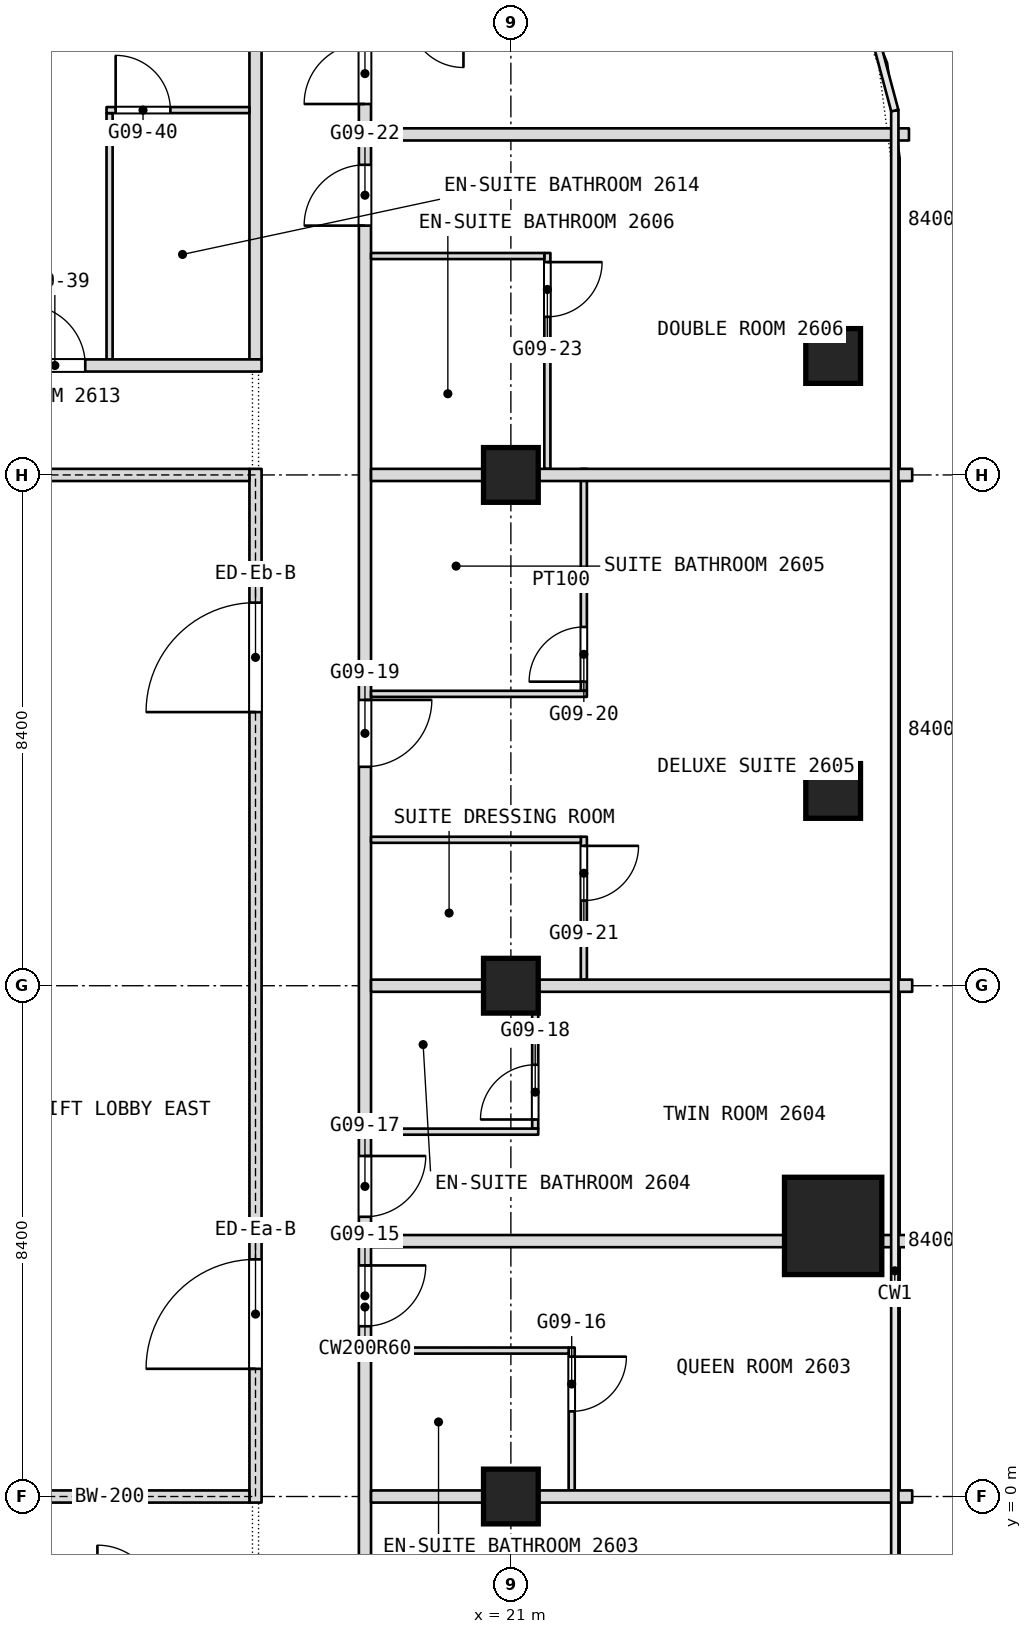
"""IFC4 building model, lengths in metres.
Left out: names, types, materials, properties, quantities, classifications, styles, units other than length and angle.
Written with IfcOpenShell. Run it as: python <this file> out.ifc"""

import sys

from ifc_helpers import new_model, si_unit, direction, frame, frame_2d, origin, origin_2d, place, context, subcontext, project, spatial, rectangle, extrude, element, fill, save


model = new_model("IFC4")
c1 = context("Model", 3, precision=1e-05, world=origin(), true_north=direction((0.0, 1.0)))
c2 = subcontext(c1, "Body", "Model", "MODEL_VIEW")
j1 = project(units=[si_unit("LENGTHUNIT", "METRE"), si_unit("PLANEANGLEUNIT", "RADIAN")], contexts=[c1])
p1 = place(None, origin())
s1 = spatial("IfcSite", under=j1, at=p1, CompositionType="ELEMENT")
p2 = place(p1, origin())
s2 = spatial("IfcBuilding", under=s1, at=p2, CompositionType="ELEMENT")
p3 = place(p2, frame((0.0, 0.0, 119.3)))
s3 = spatial("IfcBuildingStorey", under=s2, at=p3, CompositionType="ELEMENT", Elevation=119.3)
p4 = place(p3, frame((26.3, 4.45, 0.0), z_axis=(0.0, 0.0, 1.0), x_axis=(1.0, 0.0, 0.0)))
e1 = element("IfcColumn", 1, at=p4, inside=s3, PredefinedType="COLUMN", context=c2, shape_type="SweptSolid", body=[
    extrude(rectangle(XDim=1.6, YDim=1.6, at=origin_2d()), origin(), (0.0, 0.0, 1.0), 3.6),
])
for number, where, z_axis, x_axis in (
    (2, (21.0, 0.0, 0.0), (0.0, 0.0, 1.0), (1.0, 0.0, 0.0)),
    (3, (21.0, 8.4, 0.0), (0.0, 0.0, 1.0), (1.0, 0.0, 0.0)),
    (4, (21.0, 16.8, 0.0), (0.0, 0.0, 1.0), (1.0, 0.0, 0.0)),
    (5, (26.3, 18.756, 0.0), (0.0, 0.0, 1.0), (1.0, 0.0, 0.0)),
    (6, (26.3, 11.603, 0.0), (0.0, 0.0, 1.0), (1.0, 0.0, 0.0)),
):
    element("IfcColumn", number, at=place(p3, frame(where, z_axis=z_axis, x_axis=x_axis)), inside=s3, PredefinedType="COLUMN", context=c2, shape_type="SweptSolid", body=[
        extrude(rectangle(XDim=0.9, YDim=0.9, at=origin_2d()), origin(), (0.0, 0.0, 1.0), 3.6),
    ])
p5 = place(p3, frame((22.2, 8.5, 0.0), z_axis=(0.0, 0.0, 1.0), x_axis=(0.0, 1.0, 0.0)))
e7 = element("IfcWall", 7, at=p5, inside=s3, PredefinedType="PARTITIONING", context=c2, shape_type="SweptSolid", body=[
    extrude(rectangle(XDim=2.35, YDim=0.1, at=frame_2d((1.175, 0.0))), origin(), (0.0, 0.0, 1.0), 3.34),
])
p6 = place(p5, frame((1.3, 0.0, 0.0)))
e8 = element("IfcOpeningElement", 8, at=p6, cuts=e7, PredefinedType="OPENING", context=c2, shape_type="SweptSolid", body=[
    extrude(rectangle(XDim=0.9, YDim=2.1, at=frame_2d((0.45, 1.05))), frame((0.0, 0.05, 0.0), z_axis=(0.0, -1.0, 0.0), x_axis=(1.0, 0.0, 0.0)), (0.0, 0.0, 1.0), 0.1),
])
p7 = place(p3, frame((22.2, 13.25, 0.0), z_axis=(0.0, 0.0, 1.0), x_axis=(0.0, 1.0, 0.0)))
e9 = element("IfcWall", 9, at=p7, inside=s3, PredefinedType="PARTITIONING", context=c2, shape_type="SweptSolid", body=[
    extrude(rectangle(XDim=3.65, YDim=0.1, at=frame_2d((1.825, 0.0))), origin(), (0.0, 0.0, 1.0), 3.34),
])
p8 = place(p7, frame((0.15, 0.0, 0.0)))
e10 = element("IfcOpeningElement", 10, at=p8, cuts=e9, PredefinedType="OPENING", context=c2, shape_type="SweptSolid", body=[
    extrude(rectangle(XDim=0.9, YDim=2.1, at=frame_2d((0.45, 1.05))), frame((0.0, 0.05, 0.0), z_axis=(0.0, -1.0, 0.0), x_axis=(1.0, 0.0, 0.0)), (0.0, 0.0, 1.0), 0.1),
])
p9 = place(p3, frame((22.0, 0.1, 0.0), z_axis=(0.0, 0.0, 1.0), x_axis=(0.0, 1.0, 0.0)))
e11 = element("IfcWall", 11, at=p9, inside=s3, PredefinedType="PARTITIONING", context=c2, shape_type="SweptSolid", body=[
    extrude(rectangle(XDim=2.35, YDim=0.1, at=frame_2d((1.175, 0.0))), origin(), (0.0, 0.0, 1.0), 3.34),
])
p10 = place(p9, frame((1.3, 0.0, 0.0)))
e12 = element("IfcOpeningElement", 12, at=p10, cuts=e11, PredefinedType="OPENING", context=c2, shape_type="SweptSolid", body=[
    extrude(rectangle(XDim=0.9, YDim=2.1, at=frame_2d((0.45, 1.05))), frame((0.0, 0.05, 0.0), z_axis=(0.0, -1.0, 0.0), x_axis=(1.0, 0.0, 0.0)), (0.0, 0.0, 1.0), 0.1),
])
p11 = place(p3, frame((21.6, 16.9, 0.0), z_axis=(0.0, 0.0, 1.0), x_axis=(0.0, 1.0, 0.0)))
e13 = element("IfcWall", 13, at=p11, inside=s3, PredefinedType="PARTITIONING", context=c2, shape_type="SweptSolid", body=[
    extrude(rectangle(XDim=3.55, YDim=0.1, at=frame_2d((1.775, 0.0))), origin(), (0.0, 0.0, 1.0), 3.34),
])
p12 = place(p11, frame((2.5, 0.0, 0.0)))
e14 = element("IfcOpeningElement", 14, at=p12, cuts=e13, PredefinedType="OPENING", context=c2, shape_type="SweptSolid", body=[
    extrude(rectangle(XDim=0.9, YDim=2.1, at=frame_2d((0.45, 1.05))), frame((0.0, 0.05, 0.0), z_axis=(0.0, -1.0, 0.0), x_axis=(1.0, 0.0, 0.0)), (0.0, 0.0, 1.0), 0.1),
])
p13 = place(p3, frame((21.4, 6.05, 0.0), z_axis=(0.0, 0.0, 1.0), x_axis=(0.0, 1.0, 0.0)))
e15 = element("IfcWall", 15, at=p13, inside=s3, PredefinedType="PARTITIONING", context=c2, shape_type="SweptSolid", body=[
    extrude(rectangle(XDim=2.45, YDim=0.1, at=frame_2d((1.225, 0.0))), origin(), (0.0, 0.0, 1.0), 3.34),
])
p14 = place(p13, frame((0.15, 0.0, 0.0)))
e16 = element("IfcOpeningElement", 16, at=p14, cuts=e15, PredefinedType="OPENING", context=c2, shape_type="SweptSolid", body=[
    extrude(rectangle(XDim=0.9, YDim=2.1, at=frame_2d((0.45, 1.05))), frame((0.0, 0.05, 0.0), z_axis=(0.0, -1.0, 0.0), x_axis=(1.0, 0.0, 0.0)), (0.0, 0.0, 1.0), 0.1),
])
p15 = place(p3, frame((18.6, -21.708, 0.0), z_axis=(0.0, 0.0, 1.0), x_axis=(0.0, 1.0, 0.0)))
e17 = element("IfcWall", 17, at=p15, inside=s3, PredefinedType="PARTITIONING", context=c2, shape_type="SweptSolid", body=[
    extrude(rectangle(XDim=49.648, YDim=0.2, at=frame_2d((24.824, 0.0))), origin(), (0.0, 0.0, 1.0), 3.34),
])
p16 = place(p15, frame((2.8, 0.0, 0.0)))
e18 = element("IfcOpeningElement", 18, at=p16, cuts=e17, PredefinedType="OPENING", context=c2, shape_type="SweptSolid", body=[
    extrude(rectangle(XDim=1.0, YDim=2.1, at=frame_2d((0.5, 1.05))), frame((0.0, 0.1, 0.0), z_axis=(0.0, -1.0, 0.0), x_axis=(1.0, 0.0, 0.0)), (0.0, 0.0, 1.0), 0.2),
])
p17 = place(p15, frame((10.658, 0.0, 0.0)))
e19 = element("IfcOpeningElement", 19, at=p17, cuts=e17, PredefinedType="OPENING", context=c2, shape_type="SweptSolid", body=[
    extrude(rectangle(XDim=1.1, YDim=2.1, at=frame_2d((0.55, 1.05))), frame((0.0, 0.1, 0.0), z_axis=(0.0, -1.0, 0.0), x_axis=(1.0, 0.0, 0.0)), (0.0, 0.0, 1.0), 0.2),
])
p18 = place(p15, frame((16.608, 0.0, 0.0)))
e20 = element("IfcOpeningElement", 20, at=p18, cuts=e17, PredefinedType="OPENING", context=c2, shape_type="SweptSolid", body=[
    extrude(rectangle(XDim=1.8, YDim=2.1, at=frame_2d((0.9, 1.05))), frame((0.0, 0.1, 0.0), z_axis=(0.0, -1.0, 0.0), x_axis=(1.0, 0.0, 0.0)), (0.0, 0.0, 1.0), 0.2),
])
p19 = place(p15, frame((24.508, 0.0, 0.0)))
e21 = element("IfcOpeningElement", 21, at=p19, cuts=e17, PredefinedType="OPENING", context=c2, shape_type="SweptSolid", body=[
    extrude(rectangle(XDim=1.0, YDim=2.1, at=frame_2d((0.5, 1.05))), frame((0.0, 0.1, 0.0), z_axis=(0.0, -1.0, 0.0), x_axis=(1.0, 0.0, 0.0)), (0.0, 0.0, 1.0), 0.2),
])
p20 = place(p15, frame((26.308, 0.0, 0.0)))
e22 = element("IfcOpeningElement", 22, at=p20, cuts=e17, PredefinedType="OPENING", context=c2, shape_type="SweptSolid", body=[
    extrude(rectangle(XDim=1.0, YDim=2.1, at=frame_2d((0.5, 1.05))), frame((0.0, 0.1, 0.0), z_axis=(0.0, -1.0, 0.0), x_axis=(1.0, 0.0, 0.0)), (0.0, 0.0, 1.0), 0.2),
])
p21 = place(p15, frame((33.708, 0.0, 0.0)))
e23 = element("IfcOpeningElement", 23, at=p21, cuts=e17, PredefinedType="OPENING", context=c2, shape_type="SweptSolid", body=[
    extrude(rectangle(XDim=1.1, YDim=2.1, at=frame_2d((0.55, 1.05))), frame((0.0, 0.1, 0.0), z_axis=(0.0, -1.0, 0.0), x_axis=(1.0, 0.0, 0.0)), (0.0, 0.0, 1.0), 0.2),
])
p22 = place(p15, frame((42.608, 0.0, 0.0)))
e24 = element("IfcOpeningElement", 24, at=p22, cuts=e17, PredefinedType="OPENING", context=c2, shape_type="SweptSolid", body=[
    extrude(rectangle(XDim=1.0, YDim=2.1, at=frame_2d((0.5, 1.05))), frame((0.0, 0.1, 0.0), z_axis=(0.0, -1.0, 0.0), x_axis=(1.0, 0.0, 0.0)), (0.0, 0.0, 1.0), 0.2),
])
p23 = place(p15, frame((44.608, 0.0, 0.0)))
e25 = element("IfcOpeningElement", 25, at=p23, cuts=e17, PredefinedType="OPENING", context=c2, shape_type="SweptSolid", body=[
    extrude(rectangle(XDim=1.0, YDim=2.1, at=frame_2d((0.5, 1.05))), frame((0.0, 0.1, 0.0), z_axis=(0.0, -1.0, 0.0), x_axis=(1.0, 0.0, 0.0)), (0.0, 0.0, 1.0), 0.2),
])
p24 = place(p3, frame((16.8, 18.7, 0.0), z_axis=(0.0, 0.0, 1.0), x_axis=(0.0, 1.0, 0.0)))
e26 = element("IfcWall", 26, at=p24, inside=s3, PredefinedType="PARTITIONING", context=c2, shape_type="SweptSolid", body=[
    extrude(rectangle(XDim=9.24, YDim=0.2, at=frame_2d((4.62, 0.0))), origin(), (0.0, 0.0, 1.0), 3.34),
])
p25 = place(p3, frame((14.4, 18.7, 0.0), z_axis=(0.0, 0.0, 1.0), x_axis=(0.0, 1.0, 0.0)))
e27 = element("IfcWall", 27, at=p25, inside=s3, PredefinedType="PARTITIONING", context=c2, shape_type="SweptSolid", body=[
    extrude(rectangle(XDim=4.05, YDim=0.1, at=frame_2d((2.025, 0.0))), origin(), (0.0, 0.0, 1.0), 3.34),
])
p26 = place(p3, frame((18.7, 0.0, 0.0), z_axis=(0.0, 0.0, 1.0), x_axis=(1.0, 0.0, 0.0)))
e28 = element("IfcWall", 28, at=p26, inside=s3, PredefinedType="PARTITIONING", context=c2, shape_type="SweptSolid", body=[
    extrude(rectangle(XDim=8.9, YDim=0.2, at=frame_2d((4.45, 0.0))), origin(), (0.0, 0.0, 1.0), 2.89),
])
p27 = place(p3, frame((18.7, 2.4, 0.0), z_axis=(0.0, 0.0, 1.0), x_axis=(1.0, 0.0, 0.0)))
e29 = element("IfcWall", 29, at=p27, inside=s3, PredefinedType="PARTITIONING", context=c2, shape_type="SweptSolid", body=[
    extrude(rectangle(XDim=3.25, YDim=0.1, at=frame_2d((1.625, 0.0))), origin(), (0.0, 0.0, 1.0), 3.34),
])
p28 = place(p3, frame((18.7, 4.2, 0.0), z_axis=(0.0, 0.0, 1.0), x_axis=(1.0, 0.0, 0.0)))
e30 = element("IfcWall", 30, at=p28, inside=s3, PredefinedType="PARTITIONING", context=c2, shape_type="SweptSolid", body=[
    extrude(rectangle(XDim=6.8, YDim=0.2, at=frame_2d((3.4, 0.0))), origin(), (0.0, 0.0, 1.0), 3.34),
])
p29 = place(p3, frame((27.1, 4.2, 0.0), z_axis=(0.0, 0.0, 1.0), x_axis=(1.0, 0.0, 0.0)))
e31 = element("IfcWall", 31, at=p29, inside=s3, PredefinedType="PARTITIONING", context=c2, shape_type="SweptSolid", body=[
    extrude(rectangle(XDim=0.5, YDim=0.2, at=frame_2d((0.25, 0.0))), origin(), (0.0, 0.0, 1.0), 3.34),
])
p30 = place(p3, frame((18.7, 6.0, 0.0), z_axis=(0.0, 0.0, 1.0), x_axis=(1.0, 0.0, 0.0)))
e32 = element("IfcWall", 32, at=p30, inside=s3, PredefinedType="PARTITIONING", context=c2, shape_type="SweptSolid", body=[
    extrude(rectangle(XDim=2.75, YDim=0.1, at=frame_2d((1.375, 0.0))), origin(), (0.0, 0.0, 1.0), 3.34),
])
p31 = place(p3, frame((18.7, 8.4, 0.0), z_axis=(0.0, 0.0, 1.0), x_axis=(1.0, 0.0, 0.0)))
e33 = element("IfcWall", 33, at=p31, inside=s3, PredefinedType="PARTITIONING", context=c2, shape_type="SweptSolid", body=[
    extrude(rectangle(XDim=8.9, YDim=0.2, at=frame_2d((4.45, 0.0))), origin(), (0.0, 0.0, 1.0), 2.89),
])
p32 = place(p3, frame((18.7, 10.8, 0.0), z_axis=(0.0, 0.0, 1.0), x_axis=(1.0, 0.0, 0.0)))
e34 = element("IfcWall", 34, at=p32, inside=s3, PredefinedType="PARTITIONING", context=c2, shape_type="SweptSolid", body=[
    extrude(rectangle(XDim=3.45, YDim=0.1, at=frame_2d((1.725, 0.0))), origin(), (0.0, 0.0, 1.0), 3.34),
])
p33 = place(p3, frame((18.7, 13.2, 0.0), z_axis=(0.0, 0.0, 1.0), x_axis=(1.0, 0.0, 0.0)))
e35 = element("IfcWall", 35, at=p33, inside=s3, PredefinedType="PARTITIONING", context=c2, shape_type="SweptSolid", body=[
    extrude(rectangle(XDim=3.55, YDim=0.1, at=frame_2d((1.775, 0.0))), origin(), (0.0, 0.0, 1.0), 3.34),
])
p34 = place(p3, frame((18.7, 16.8, 0.0), z_axis=(0.0, 0.0, 1.0), x_axis=(1.0, 0.0, 0.0)))
e36 = element("IfcWall", 36, at=p34, inside=s3, PredefinedType="PARTITIONING", context=c2, shape_type="SweptSolid", body=[
    extrude(rectangle(XDim=8.9, YDim=0.2, at=frame_2d((4.45, 0.0))), origin(), (0.0, 0.0, 1.0), 2.89),
])
p35 = place(p3, frame((10.7, 18.6, 0.0), z_axis=(0.0, 0.0, 1.0), x_axis=(1.0, 0.0, 0.0)))
e37 = element("IfcWall", 37, at=p35, inside=s3, PredefinedType="PARTITIONING", context=c2, shape_type="SweptSolid", body=[
    extrude(rectangle(XDim=6.2, YDim=0.2, at=frame_2d((3.1, 0.0))), origin(), (0.0, 0.0, 1.0), 3.34),
])
p36 = place(p35, frame((2.3, 0.0, 0.0)))
e38 = element("IfcOpeningElement", 38, at=p36, cuts=e37, PredefinedType="OPENING", context=c2, shape_type="SweptSolid", body=[
    extrude(rectangle(XDim=1.0, YDim=2.1, at=frame_2d((0.5, 1.05))), frame((0.0, 0.1, 0.0), z_axis=(0.0, -1.0, 0.0), x_axis=(1.0, 0.0, 0.0)), (0.0, 0.0, 1.0), 0.2),
])
p37 = place(p3, frame((18.7, 20.4, 0.0), z_axis=(0.0, 0.0, 1.0), x_axis=(1.0, 0.0, 0.0)))
e39 = element("IfcWall", 39, at=p37, inside=s3, PredefinedType="PARTITIONING", context=c2, shape_type="SweptSolid", body=[
    extrude(rectangle(XDim=2.85, YDim=0.1, at=frame_2d((1.425, 0.0))), origin(), (0.0, 0.0, 1.0), 3.34),
])
p38 = place(p3, frame((18.7, 22.4, 0.0), z_axis=(0.0, 0.0, 1.0), x_axis=(1.0, 0.0, 0.0)))
e40 = element("IfcWall", 40, at=p38, inside=s3, PredefinedType="PARTITIONING", context=c2, shape_type="SweptSolid", body=[
    extrude(rectangle(XDim=8.847, YDim=0.2, at=frame_2d((4.424, 0.0))), origin(), (0.0, 0.0, 1.0), 3.34),
])
p39 = place(p3, frame((14.35, 22.8, 0.0), z_axis=(0.0, 0.0, 1.0), x_axis=(1.0, 0.0, 0.0)))
e41 = element("IfcWall", 41, at=p39, inside=s3, PredefinedType="PARTITIONING", context=c2, shape_type="SweptSolid", body=[
    extrude(rectangle(XDim=2.35, YDim=0.1, at=frame_2d((1.175, 0.0))), origin(), (0.0, 0.0, 1.0), 3.34),
])
p40 = place(p39, frame((0.15, 0.0, 0.0)))
e42 = element("IfcOpeningElement", 42, at=p40, cuts=e41, PredefinedType="OPENING", context=c2, shape_type="SweptSolid", body=[
    extrude(rectangle(XDim=0.9, YDim=2.1, at=frame_2d((0.45, 1.05))), frame((0.0, 0.05, 0.0), z_axis=(0.0, -1.0, 0.0), x_axis=(1.0, 0.0, 0.0)), (0.0, 0.0, 1.0), 0.1),
])
p41 = place(p3, frame((16.8, -0.1, 0.0), z_axis=(0.0, 0.0, 1.0), x_axis=(0.0, 1.0, 0.0)))
e43 = element("IfcWall", 43, at=p41, inside=s3, PredefinedType="PARTITIONING", context=c2, shape_type="SweptSolid", body=[
    extrude(rectangle(XDim=17.0, YDim=0.2, at=frame_2d((8.5, 0.0))), origin(), (0.0, 0.0, 1.0), 3.34),
])
p42 = place(p41, frame((2.2, 0.0, 0.0)))
e44 = element("IfcOpeningElement", 44, at=p42, cuts=e43, PredefinedType="OPENING", context=c2, shape_type="SweptSolid", body=[
    extrude(rectangle(XDim=1.8, YDim=2.1, at=frame_2d((0.9, 1.05))), frame((0.0, 0.1, 0.0), z_axis=(0.0, -1.0, 0.0), x_axis=(1.0, 0.0, 0.0)), (0.0, 0.0, 1.0), 0.2),
])
p43 = place(p41, frame((13.0, 0.0, 0.0)))
e45 = element("IfcOpeningElement", 45, at=p43, cuts=e43, PredefinedType="OPENING", context=c2, shape_type="SweptSolid", body=[
    extrude(rectangle(XDim=1.8, YDim=2.1, at=frame_2d((0.9, 1.05))), frame((0.0, 0.1, 0.0), z_axis=(0.0, -1.0, 0.0), x_axis=(1.0, 0.0, 0.0)), (0.0, 0.0, 1.0), 0.2),
])
for number, where, z_axis, x_axis in (
    (46, (12.1, 0.0, 0.0), (0.0, 0.0, 1.0), (1.0, 0.0, 0.0)),
    (47, (12.1, 16.8, 0.0), (0.0, 0.0, 1.0), (1.0, 0.0, 0.0)),
):
    element("IfcWall", number, at=place(p3, frame(where, z_axis=z_axis, x_axis=x_axis)), inside=s3, PredefinedType="PARTITIONING", context=c2, shape_type="SweptSolid", body=[
        extrude(rectangle(XDim=4.6, YDim=0.2, at=frame_2d((2.3, 0.0))), origin(), (0.0, 0.0, 1.0), 2.89),
    ])
p44 = place(p6, origin())
e48 = element("IfcDoor", 48, at=p44, inside=s3, OperationType="SINGLE_SWING_RIGHT", PredefinedType="DOOR", context=c2, shape_type="SweptSolid", body=[
    extrude(rectangle(XDim=0.9, YDim=2.1, at=frame_2d((0.45, 1.05))), frame((0.0, 0.025, 0.0), z_axis=(0.0, -1.0, 0.0), x_axis=(1.0, 0.0, 0.0)), (0.0, 0.0, 1.0), 0.05),
])
fill(e8, e48)
p45 = place(p8, origin())
e49 = element("IfcDoor", 49, at=p45, inside=s3, OperationType="SINGLE_SWING_LEFT", PredefinedType="DOOR", context=c2, shape_type="SweptSolid", body=[
    extrude(rectangle(XDim=0.9, YDim=2.1, at=frame_2d((0.45, 1.05))), frame((0.0, 0.025, 0.0), z_axis=(0.0, -1.0, 0.0), x_axis=(1.0, 0.0, 0.0)), (0.0, 0.0, 1.0), 0.05),
])
fill(e10, e49)
p46 = place(p10, origin())
e50 = element("IfcDoor", 50, at=p46, inside=s3, OperationType="SINGLE_SWING_RIGHT", PredefinedType="DOOR", context=c2, shape_type="SweptSolid", body=[
    extrude(rectangle(XDim=0.9, YDim=2.1, at=frame_2d((0.45, 1.05))), frame((0.0, 0.025, 0.0), z_axis=(0.0, -1.0, 0.0), x_axis=(1.0, 0.0, 0.0)), (0.0, 0.0, 1.0), 0.05),
])
fill(e12, e50)
p47 = place(p12, origin())
e51 = element("IfcDoor", 51, at=p47, inside=s3, OperationType="SINGLE_SWING_RIGHT", PredefinedType="DOOR", context=c2, shape_type="SweptSolid", body=[
    extrude(rectangle(XDim=0.9, YDim=2.1, at=frame_2d((0.45, 1.05))), frame((0.0, 0.025, 0.0), z_axis=(0.0, -1.0, 0.0), x_axis=(1.0, 0.0, 0.0)), (0.0, 0.0, 1.0), 0.05),
])
fill(e14, e51)
p48 = place(p14, origin())
e52 = element("IfcDoor", 52, at=p48, inside=s3, OperationType="SINGLE_SWING_LEFT", PredefinedType="DOOR", context=c2, shape_type="SweptSolid", body=[
    extrude(rectangle(XDim=0.9, YDim=2.1, at=frame_2d((0.45, 1.05))), frame((0.0, 0.025, 0.0), z_axis=(0.0, -1.0, 0.0), x_axis=(1.0, 0.0, 0.0)), (0.0, 0.0, 1.0), 0.05),
])
fill(e16, e52)
p49 = place(p19, origin())
e53 = element("IfcDoor", 53, at=p49, inside=s3, OperationType="SINGLE_SWING_LEFT", PredefinedType="DOOR", context=c2, shape_type="SweptSolid", body=[
    extrude(rectangle(XDim=1.0, YDim=2.1, at=frame_2d((0.5, 1.05))), frame((0.0, 0.025, 0.0), z_axis=(0.0, -1.0, 0.0), x_axis=(1.0, 0.0, 0.0)), (0.0, 0.0, 1.0), 0.05),
])
fill(e21, e53)
p50 = place(p20, origin())
e54 = element("IfcDoor", 54, at=p50, inside=s3, OperationType="SINGLE_SWING_LEFT", PredefinedType="DOOR", context=c2, shape_type="SweptSolid", body=[
    extrude(rectangle(XDim=1.0, YDim=2.1, at=frame_2d((0.5, 1.05))), frame((0.0, 0.025, 0.0), z_axis=(0.0, -1.0, 0.0), x_axis=(1.0, 0.0, 0.0)), (0.0, 0.0, 1.0), 0.05),
])
fill(e22, e54)
p51 = place(p21, origin())
e55 = element("IfcDoor", 55, at=p51, inside=s3, OperationType="SINGLE_SWING_LEFT", PredefinedType="DOOR", context=c2, shape_type="SweptSolid", body=[
    extrude(rectangle(XDim=1.1, YDim=2.1, at=frame_2d((0.55, 1.05))), frame((0.0, 0.025, 0.0), z_axis=(0.0, -1.0, 0.0), x_axis=(1.0, 0.0, 0.0)), (0.0, 0.0, 1.0), 0.05),
])
fill(e23, e55)
p52 = place(p22, origin())
e56 = element("IfcDoor", 56, at=p52, inside=s3, OperationType="SINGLE_SWING_RIGHT", PredefinedType="DOOR", context=c2, shape_type="SweptSolid", body=[
    extrude(rectangle(XDim=1.0, YDim=2.1, at=frame_2d((0.5, 1.05))), frame((0.0, 0.025, 0.0), z_axis=(0.0, -1.0, 0.0), x_axis=(1.0, 0.0, 0.0)), (0.0, 0.0, 1.0), 0.05),
])
fill(e24, e56)
p53 = place(p23, origin())
e57 = element("IfcDoor", 57, at=p53, inside=s3, OperationType="SINGLE_SWING_RIGHT", PredefinedType="DOOR", context=c2, shape_type="SweptSolid", body=[
    extrude(rectangle(XDim=1.0, YDim=2.1, at=frame_2d((0.5, 1.05))), frame((0.0, 0.025, 0.0), z_axis=(0.0, -1.0, 0.0), x_axis=(1.0, 0.0, 0.0)), (0.0, 0.0, 1.0), 0.05),
])
fill(e25, e57)
p54 = place(p36, origin())
e58 = element("IfcDoor", 58, at=p54, inside=s3, OperationType="SINGLE_SWING_RIGHT", PredefinedType="DOOR", context=c2, shape_type="SweptSolid", body=[
    extrude(rectangle(XDim=1.0, YDim=2.1, at=frame_2d((0.5, 1.05))), frame((0.0, 0.025, 0.0), z_axis=(0.0, -1.0, 0.0), x_axis=(1.0, 0.0, 0.0)), (0.0, 0.0, 1.0), 0.05),
])
fill(e38, e58)
p55 = place(p40, origin())
e59 = element("IfcDoor", 59, at=p55, inside=s3, OperationType="SINGLE_SWING_RIGHT", PredefinedType="DOOR", context=c2, shape_type="SweptSolid", body=[
    extrude(rectangle(XDim=0.9, YDim=2.1, at=frame_2d((0.45, 1.05))), frame((0.0, 0.025, 0.0), z_axis=(0.0, -1.0, 0.0), x_axis=(1.0, 0.0, 0.0)), (0.0, 0.0, 1.0), 0.05),
])
fill(e42, e59)
p56 = place(p42, origin())
e60 = element("IfcDoor", 60, at=p56, inside=s3, OperationType="DOUBLE_DOOR_SINGLE_SWING", PredefinedType="DOOR", context=c2, shape_type="SweptSolid", body=[
    extrude(rectangle(XDim=1.8, YDim=2.1, at=frame_2d((0.9, 1.05))), frame((0.0, 0.025, 0.0), z_axis=(0.0, -1.0, 0.0), x_axis=(1.0, 0.0, 0.0)), (0.0, 0.0, 1.0), 0.05),
])
fill(e44, e60)
p57 = place(p43, origin())
e61 = element("IfcDoor", 61, at=p57, inside=s3, OperationType="DOUBLE_DOOR_SINGLE_SWING", PredefinedType="DOOR", context=c2, shape_type="SweptSolid", body=[
    extrude(rectangle(XDim=1.8, YDim=2.1, at=frame_2d((0.9, 1.05))), frame((0.0, 0.025, 0.0), z_axis=(0.0, -1.0, 0.0), x_axis=(1.0, 0.0, 0.0)), (0.0, 0.0, 1.0), 0.05),
])
fill(e45, e61)
save(model, sys.argv[1])
